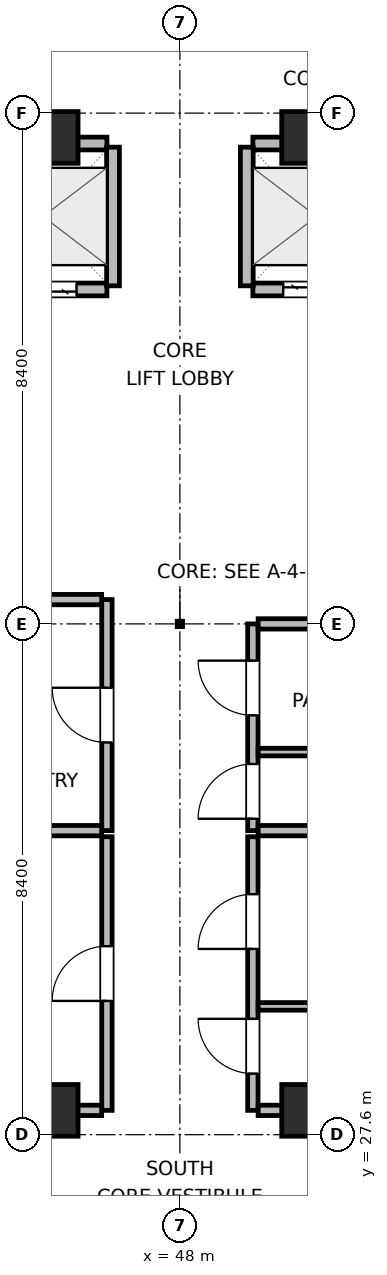
"""IFC4 building model, lengths in metres.
Left out: names, types, materials, properties, quantities, classifications, styles, units other than length and angle.
Written with IfcOpenShell. Run it as: python <this file> out.ifc"""

import sys

from ifc_helpers import new_model, si_unit, direction, frame, frame_2d, origin, origin_2d, place, context, subcontext, project, spatial, rectangle, extrude, element, fill, save


model = new_model("IFC4")
c1 = context("Model", 3, precision=1e-05, world=origin(), true_north=direction((0.0, 1.0)))
c2 = subcontext(c1, "Body", "Model", "MODEL_VIEW")
j1 = project(units=[si_unit("LENGTHUNIT", "METRE"), si_unit("PLANEANGLEUNIT", "RADIAN")], contexts=[c1])
p1 = place(None, origin())
s1 = spatial("IfcSite", under=j1, at=p1, CompositionType="ELEMENT")
p2 = place(p1, origin())
s2 = spatial("IfcBuilding", under=s1, at=p2, CompositionType="ELEMENT")
p3 = place(p2, frame((0.0, 0.0, 205.8)))
s3 = spatial("IfcBuildingStorey", under=s2, at=p3, CompositionType="ELEMENT", Elevation=205.8)
for number, where, z_axis, x_axis in (
    (1, (45.9, 28.0, 0.0), (0.0, 0.0, 1.0), (1.0, 0.0, 0.0)),
    (2, (50.1, 28.0, 0.0), (0.0, 0.0, 1.0), (1.0, 0.0, 0.0)),
    (3, (45.9, 44.0, 0.0), (0.0, 0.0, 1.0), (1.0, 0.0, 0.0)),
    (4, (50.1, 44.0, 0.0), (0.0, 0.0, 1.0), (1.0, 0.0, 0.0)),
):
    element("IfcColumn", number, at=place(p3, frame(where, z_axis=z_axis, x_axis=x_axis)), inside=s3, PredefinedType="COLUMN", context=c2, shape_type="SweptSolid", body=[
        extrude(rectangle(XDim=0.85, YDim=0.85, at=origin_2d()), origin(), (0.0, 0.0, 1.0), 3.9),
    ])
p4 = place(p3, frame((44.7, 41.5, 0.0), z_axis=(0.0, 0.0, 1.0), x_axis=(1.0, 0.0, 0.0)))
e5 = element("IfcWall", 5, at=p4, inside=s3, PredefinedType="PARTITIONING", context=c2, shape_type="SweptSolid", body=[
    extrude(rectangle(XDim=2.1, YDim=0.21, at=frame_2d((1.05, 0.0))), origin(), (0.0, 0.0, 1.0), 3.6),
])
p5 = place(p4, frame((0.5, 0.0, 0.0)))
e6 = element("IfcOpeningElement", 6, at=p5, cuts=e5, PredefinedType="OPENING", context=c2, shape_type="SweptSolid", body=[
    extrude(rectangle(XDim=1.1, YDim=2.04, at=frame_2d((0.55, 1.02))), frame((0.0, 0.115, 0.0), z_axis=(0.0, -1.0, 0.0), x_axis=(1.0, 0.0, 0.0)), (0.0, 0.0, 1.0), 0.23),
])
p6 = place(p3, frame((44.7, 43.9, 0.0), z_axis=(0.0, 0.0, 1.0), x_axis=(1.0, 0.0, 0.0)))
e7 = element("IfcWall", 7, at=p6, inside=s3, PredefinedType="PARTITIONING", context=c2, shape_type="SweptSolid", body=[
    extrude(rectangle(XDim=2.1, YDim=0.21, at=frame_2d((1.05, 0.0))), origin(), (0.0, 0.0, 1.0), 2.685),
])
p7 = place(p3, frame((46.9, 41.56, 0.0), z_axis=(0.0, 0.0, 1.0), x_axis=(0.0, 1.0, 0.0)))
e8 = element("IfcWall", 8, at=p7, inside=s3, PredefinedType="PARTITIONING", context=c2, shape_type="SweptSolid", body=[
    extrude(rectangle(XDim=2.28, YDim=0.21, at=frame_2d((1.14, 0.0))), origin(), (0.0, 0.0, 1.0), 3.6),
])
p8 = place(p3, frame((49.2, 41.5, 0.0), z_axis=(0.0, 0.0, 1.0), x_axis=(1.0, 0.0, 0.0)))
e9 = element("IfcWall", 9, at=p8, inside=s3, PredefinedType="PARTITIONING", context=c2, shape_type="SweptSolid", body=[
    extrude(rectangle(XDim=2.1, YDim=0.21, at=frame_2d((1.05, 0.0))), origin(), (0.0, 0.0, 1.0), 3.6),
])
p9 = place(p8, frame((0.5, 0.0, 0.0)))
e10 = element("IfcOpeningElement", 10, at=p9, cuts=e9, PredefinedType="OPENING", context=c2, shape_type="SweptSolid", body=[
    extrude(rectangle(XDim=1.1, YDim=2.04, at=frame_2d((0.55, 1.02))), frame((0.0, 0.115, 0.0), z_axis=(0.0, -1.0, 0.0), x_axis=(1.0, 0.0, 0.0)), (0.0, 0.0, 1.0), 0.23),
])
p10 = place(p3, frame((49.2, 43.9, 0.0), z_axis=(0.0, 0.0, 1.0), x_axis=(1.0, 0.0, 0.0)))
e11 = element("IfcWall", 11, at=p10, inside=s3, PredefinedType="PARTITIONING", context=c2, shape_type="SweptSolid", body=[
    extrude(rectangle(XDim=2.1, YDim=0.21, at=frame_2d((1.05, 0.0))), origin(), (0.0, 0.0, 1.0), 2.685),
])
p11 = place(p3, frame((49.1, 41.56, 0.0), z_axis=(0.0, 0.0, 1.0), x_axis=(0.0, 1.0, 0.0)))
e12 = element("IfcWall", 12, at=p11, inside=s3, PredefinedType="PARTITIONING", context=c2, shape_type="SweptSolid", body=[
    extrude(rectangle(XDim=2.28, YDim=0.21, at=frame_2d((1.14, 0.0))), origin(), (0.0, 0.0, 1.0), 3.6),
])
p12 = place(p3, frame((46.8, 32.6, 0.0), z_axis=(0.0, 0.0, 1.0), x_axis=(0.0, 1.0, 0.0)))
e13 = element("IfcWall", 13, at=p12, inside=s3, PredefinedType="PARTITIONING", context=c2, shape_type="SweptSolid", body=[
    extrude(rectangle(XDim=3.8, YDim=0.17, at=frame_2d((1.9, 0.0))), origin(), (0.0, 0.0, 1.0), 3.6),
])
p13 = place(p12, frame((1.45, 0.0, 0.0)))
e14 = element("IfcOpeningElement", 14, at=p13, cuts=e13, PredefinedType="OPENING", context=c2, shape_type="SweptSolid", body=[
    extrude(rectangle(XDim=0.9, YDim=2.02, at=frame_2d((0.45, 1.01))), frame((0.0, 0.095, 0.0), z_axis=(0.0, -1.0, 0.0), x_axis=(1.0, 0.0, 0.0)), (0.0, 0.0, 1.0), 0.19),
])
for number, where, z_axis, x_axis in (
    (15, (43.8, 32.6, 0.0), (0.0, 0.0, 1.0), (1.0, 0.0, 0.0)),
    (16, (43.8, 36.4, 0.0), (0.0, 0.0, 1.0), (1.0, 0.0, 0.0)),
):
    element("IfcWall", number, at=place(p3, frame(where, z_axis=z_axis, x_axis=x_axis)), inside=s3, PredefinedType="PARTITIONING", context=c2, shape_type="SweptSolid", body=[
        extrude(rectangle(XDim=2.913, YDim=0.17, at=frame_2d((1.457, 0.0))), origin(), (0.0, 0.0, 1.0), 3.6),
    ])
p14 = place(p3, frame((49.2, 32.6, 0.0), z_axis=(0.0, 0.0, 1.0), x_axis=(0.0, 1.0, 0.0)))
e17 = element("IfcWall", 17, at=p14, inside=s3, PredefinedType="PARTITIONING", context=c2, shape_type="SweptSolid", body=[
    extrude(rectangle(XDim=3.4, YDim=0.17, at=frame_2d((1.7, 0.0))), origin(), (0.0, 0.0, 1.0), 3.6),
])
p15 = place(p14, frame((0.196, 0.0, 0.0)))
e18 = element("IfcOpeningElement", 18, at=p15, cuts=e17, PredefinedType="OPENING", context=c2, shape_type="SweptSolid", body=[
    extrude(rectangle(XDim=0.9, YDim=2.02, at=frame_2d((0.45, 1.01))), frame((0.0, 0.095, 0.0), z_axis=(0.0, -1.0, 0.0), x_axis=(1.0, 0.0, 0.0)), (0.0, 0.0, 1.0), 0.19),
])
p16 = place(p14, frame((1.896, 0.0, 0.0)))
e19 = element("IfcOpeningElement", 19, at=p16, cuts=e17, PredefinedType="OPENING", context=c2, shape_type="SweptSolid", body=[
    extrude(rectangle(XDim=0.9, YDim=2.02, at=frame_2d((0.45, 1.01))), frame((0.0, 0.095, 0.0), z_axis=(0.0, -1.0, 0.0), x_axis=(1.0, 0.0, 0.0)), (0.0, 0.0, 1.0), 0.19),
])
for number, where, z_axis, x_axis in (
    (20, (49.287, 32.6, 0.0), (0.0, 0.0, 1.0), (1.0, 0.0, 0.0)),
    (21, (49.287, 36.0, 0.0), (0.0, 0.0, 1.0), (1.0, 0.0, 0.0)),
):
    element("IfcWall", number, at=place(p3, frame(where, z_axis=z_axis, x_axis=x_axis)), inside=s3, PredefinedType="PARTITIONING", context=c2, shape_type="SweptSolid", body=[
        extrude(rectangle(XDim=2.913, YDim=0.17, at=frame_2d((1.457, 0.0))), origin(), (0.0, 0.0, 1.0), 3.6),
    ])
p17 = place(p3, frame((49.287, 33.892, 0.0), z_axis=(0.0, 0.0, 1.0), x_axis=(1.0, 0.0, 0.0)))
e22 = element("IfcWall", 22, at=p17, inside=s3, PredefinedType="PARTITIONING", context=c2, shape_type="SweptSolid", body=[
    extrude(rectangle(XDim=2.913, YDim=0.125, at=frame_2d((1.457, 0.0))), origin(), (0.0, 0.0, 1.0), 3.6),
])
p18 = place(p3, frame((46.8, 28.0, 0.0), z_axis=(0.0, 0.0, 1.0), x_axis=(0.0, 1.0, 0.0)))
e23 = element("IfcWall", 23, at=p18, inside=s3, PredefinedType="PARTITIONING", context=c2, shape_type="SweptSolid", body=[
    extrude(rectangle(XDim=4.5, YDim=0.17, at=frame_2d((2.25, 0.0))), origin(), (0.0, 0.0, 1.0), 3.6),
])
p19 = place(p18, frame((1.8, 0.0, 0.0)))
e24 = element("IfcOpeningElement", 24, at=p19, cuts=e23, PredefinedType="OPENING", context=c2, shape_type="SweptSolid", body=[
    extrude(rectangle(XDim=0.9, YDim=2.02, at=frame_2d((0.45, 1.01))), frame((0.0, 0.095, 0.0), z_axis=(0.0, -1.0, 0.0), x_axis=(1.0, 0.0, 0.0)), (0.0, 0.0, 1.0), 0.19),
])
p20 = place(p3, frame((42.5, 28.0, 0.0), z_axis=(0.0, 0.0, 1.0), x_axis=(1.0, 0.0, 0.0)))
e25 = element("IfcWall", 25, at=p20, inside=s3, PredefinedType="PARTITIONING", context=c2, shape_type="SweptSolid", body=[
    extrude(rectangle(XDim=4.213, YDim=0.17, at=frame_2d((2.106, 0.0))), origin(), (0.0, 0.0, 1.0), 2.685),
])
p21 = place(p3, frame((49.2, 28.0, 0.0), z_axis=(0.0, 0.0, 1.0), x_axis=(0.0, 1.0, 0.0)))
e26 = element("IfcWall", 26, at=p21, inside=s3, PredefinedType="PARTITIONING", context=c2, shape_type="SweptSolid", body=[
    extrude(rectangle(XDim=4.5, YDim=0.17, at=frame_2d((2.25, 0.0))), origin(), (0.0, 0.0, 1.0), 3.6),
])
p22 = place(p21, frame((0.605, 0.0, 0.0)))
e27 = element("IfcOpeningElement", 27, at=p22, cuts=e26, PredefinedType="OPENING", context=c2, shape_type="SweptSolid", body=[
    extrude(rectangle(XDim=0.9, YDim=2.02, at=frame_2d((0.45, 1.01))), frame((0.0, 0.095, 0.0), z_axis=(0.0, -1.0, 0.0), x_axis=(1.0, 0.0, 0.0)), (0.0, 0.0, 1.0), 0.19),
])
p23 = place(p21, frame((2.655, 0.0, 0.0)))
e28 = element("IfcOpeningElement", 28, at=p23, cuts=e26, PredefinedType="OPENING", context=c2, shape_type="SweptSolid", body=[
    extrude(rectangle(XDim=0.9, YDim=2.02, at=frame_2d((0.45, 1.01))), frame((0.0, 0.095, 0.0), z_axis=(0.0, -1.0, 0.0), x_axis=(1.0, 0.0, 0.0)), (0.0, 0.0, 1.0), 0.19),
])
p24 = place(p3, frame((49.287, 28.0, 0.0), z_axis=(0.0, 0.0, 1.0), x_axis=(1.0, 0.0, 0.0)))
e29 = element("IfcWall", 29, at=p24, inside=s3, PredefinedType="PARTITIONING", context=c2, shape_type="SweptSolid", body=[
    extrude(rectangle(XDim=4.213, YDim=0.17, at=frame_2d((2.106, 0.0))), origin(), (0.0, 0.0, 1.0), 2.685),
])
p25 = place(p3, frame((49.287, 29.71, 0.0), z_axis=(0.0, 0.0, 1.0), x_axis=(1.0, 0.0, 0.0)))
e30 = element("IfcWall", 30, at=p25, inside=s3, PredefinedType="PARTITIONING", context=c2, shape_type="SweptSolid", body=[
    extrude(rectangle(XDim=4.213, YDim=0.125, at=frame_2d((2.106, 0.0))), origin(), (0.0, 0.0, 1.0), 3.6),
])
p26 = place(p5, origin())
e31 = element("IfcDoor", 31, at=p26, inside=s3, OperationType="DOUBLE_DOOR_SLIDING", PredefinedType="DOOR", context=c2, shape_type="SweptSolid", body=[
    extrude(rectangle(XDim=1.1, YDim=2.04, at=frame_2d((0.55, 1.02))), frame((0.0, 0.025, 0.0), z_axis=(0.0, -1.0, 0.0), x_axis=(1.0, 0.0, 0.0)), (0.0, 0.0, 1.0), 0.05),
])
fill(e6, e31)
p27 = place(p9, origin())
e32 = element("IfcDoor", 32, at=p27, inside=s3, OperationType="DOUBLE_DOOR_SLIDING", PredefinedType="DOOR", context=c2, shape_type="SweptSolid", body=[
    extrude(rectangle(XDim=1.1, YDim=2.04, at=frame_2d((0.55, 1.02))), frame((0.0, 0.025, 0.0), z_axis=(0.0, -1.0, 0.0), x_axis=(1.0, 0.0, 0.0)), (0.0, 0.0, 1.0), 0.05),
])
fill(e10, e32)
p28 = place(p13, origin())
e33 = element("IfcDoor", 33, at=p28, inside=s3, OperationType="SINGLE_SWING_RIGHT", PredefinedType="DOOR", context=c2, shape_type="SweptSolid", body=[
    extrude(rectangle(XDim=0.9, YDim=2.02, at=frame_2d((0.45, 1.01))), frame((0.0, 0.025, 0.0), z_axis=(0.0, -1.0, 0.0), x_axis=(1.0, 0.0, 0.0)), (0.0, 0.0, 1.0), 0.05),
])
fill(e14, e33)
p29 = place(p15, origin())
e34 = element("IfcDoor", 34, at=p29, inside=s3, OperationType="SINGLE_SWING_LEFT", PredefinedType="DOOR", context=c2, shape_type="SweptSolid", body=[
    extrude(rectangle(XDim=0.9, YDim=2.02, at=frame_2d((0.45, 1.01))), frame((0.0, 0.025, 0.0), z_axis=(0.0, -1.0, 0.0), x_axis=(1.0, 0.0, 0.0)), (0.0, 0.0, 1.0), 0.05),
])
fill(e18, e34)
p30 = place(p16, origin())
e35 = element("IfcDoor", 35, at=p30, inside=s3, OperationType="SINGLE_SWING_RIGHT", PredefinedType="DOOR", context=c2, shape_type="SweptSolid", body=[
    extrude(rectangle(XDim=0.9, YDim=2.02, at=frame_2d((0.45, 1.01))), frame((0.0, 0.025, 0.0), z_axis=(0.0, -1.0, 0.0), x_axis=(1.0, 0.0, 0.0)), (0.0, 0.0, 1.0), 0.05),
])
fill(e19, e35)
p31 = place(p19, origin())
e36 = element("IfcDoor", 36, at=p31, inside=s3, OperationType="SINGLE_SWING_LEFT", PredefinedType="DOOR", context=c2, shape_type="SweptSolid", body=[
    extrude(rectangle(XDim=0.9, YDim=2.02, at=frame_2d((0.45, 1.01))), frame((0.0, 0.025, 0.0), z_axis=(0.0, -1.0, 0.0), x_axis=(1.0, 0.0, 0.0)), (0.0, 0.0, 1.0), 0.05),
])
fill(e24, e36)
p32 = place(p22, origin())
e37 = element("IfcDoor", 37, at=p32, inside=s3, OperationType="SINGLE_SWING_RIGHT", PredefinedType="DOOR", context=c2, shape_type="SweptSolid", body=[
    extrude(rectangle(XDim=0.9, YDim=2.02, at=frame_2d((0.45, 1.01))), frame((0.0, 0.025, 0.0), z_axis=(0.0, -1.0, 0.0), x_axis=(1.0, 0.0, 0.0)), (0.0, 0.0, 1.0), 0.05),
])
fill(e27, e37)
p33 = place(p23, origin())
e38 = element("IfcDoor", 38, at=p33, inside=s3, OperationType="SINGLE_SWING_LEFT", PredefinedType="DOOR", context=c2, shape_type="SweptSolid", body=[
    extrude(rectangle(XDim=0.9, YDim=2.02, at=frame_2d((0.45, 1.01))), frame((0.0, 0.025, 0.0), z_axis=(0.0, -1.0, 0.0), x_axis=(1.0, 0.0, 0.0)), (0.0, 0.0, 1.0), 0.05),
])
fill(e28, e38)
save(model, sys.argv[1])
